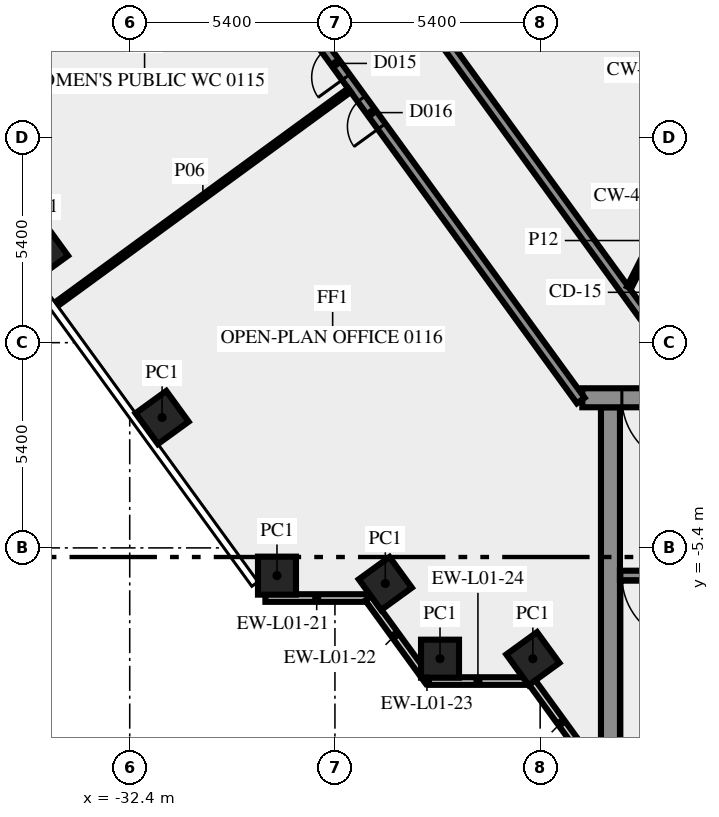
"""IFC4 building model, lengths in metres.
Left out: names, types, materials, properties, quantities, classifications, styles, units other than length and angle.
Written with IfcOpenShell. Run it as: python <this file> out.ifc"""

import sys

from ifc_helpers import new_model, si_unit, direction, frame, frame_2d, origin, origin_2d, place, context, subcontext, project, spatial, rectangle, extrude, element, fill, save


model = new_model("IFC4")
c1 = context("Model", 3, precision=1e-05, world=origin(), true_north=direction((0.0, 1.0)))
c2 = subcontext(c1, "Body", "Model", "MODEL_VIEW")
j1 = project(units=[si_unit("LENGTHUNIT", "METRE"), si_unit("PLANEANGLEUNIT", "RADIAN")], contexts=[c1])
p1 = place(None, origin())
s1 = spatial("IfcSite", under=j1, at=p1, CompositionType="ELEMENT")
p2 = place(p1, origin())
s2 = spatial("IfcBuilding", under=s1, at=p2, CompositionType="ELEMENT")
p3 = place(p2, frame((0.0, 0.0, 6.0)))
s3 = spatial("IfcBuildingStorey", under=s2, at=p3, CompositionType="ELEMENT", Elevation=6.0)
for number, where, z_axis, x_axis in (
    (1, (-34.722, 2.4, 0.0), (0.0, 0.0, 1.0), (0.588, -0.809, 0.0)),
    (2, (-31.548, -1.969, 0.0), (0.0, 0.0, 1.0), (0.588, -0.809, 0.0)),
    (3, (-28.525, -6.13, 0.0), (0.0, 0.0, 1.0), (1.0, 0.0, 0.0)),
    (4, (-25.674, -6.337, 0.0), (0.0, 0.0, 1.0), (0.588, -0.809, 0.0)),
    (5, (-24.235, -8.315, 0.0), (0.0, 0.0, 1.0), (1.0, 0.0, 0.0)),
    (6, (-21.792, -8.315, 0.0), (0.0, 0.0, 1.0), (0.588, -0.809, 0.0)),
):
    element("IfcColumn", number, at=place(p3, frame(where, z_axis=z_axis, x_axis=x_axis)), inside=s3, PredefinedType="COLUMN", context=c2, shape_type="SweptSolid", body=[
        extrude(rectangle(XDim=1.0, YDim=1.0, at=origin_2d()), origin(), (0.0, 0.0, 1.0), 5.1),
    ])
p4 = place(p3, frame((-28.83, -6.719, 0.0), z_axis=(0.0, 0.0, 1.0), x_axis=(1.0, 0.0, 0.0)))
e7 = element("IfcWall", 7, at=p4, inside=s3, PredefinedType="SOLIDWALL", context=c2, shape_type="SweptSolid", body=[
    extrude(rectangle(XDim=2.7, YDim=0.2, at=frame_2d((1.35, 0.0))), origin(), (0.0, 0.0, 1.0), 5.1),
])
p5 = place(p3, frame((-26.12, -6.724, 0.0), z_axis=(0.0, 0.0, 1.0), x_axis=(0.587706476352, -0.809074222587, 0.0)))
e8 = element("IfcWall", 8, at=p5, inside=s3, PredefinedType="SOLIDWALL", context=c2, shape_type="SweptSolid", body=[
    extrude(rectangle(XDim=2.403, YDim=0.2, at=frame_2d((1.202, 0.0))), origin(), (0.0, 0.0, 1.0), 5.1),
])
p6 = place(p3, frame((-24.624, -8.784, 0.0), z_axis=(0.0, 0.0, 1.0), x_axis=(0.586760218966, -0.809760733451, 0.0)))
e9 = element("IfcWall", 9, at=p6, inside=s3, PredefinedType="SOLIDWALL", context=c2, shape_type="SweptSolid", body=[
    extrude(rectangle(XDim=0.154, YDim=0.2, at=frame_2d((0.077, 0.0))), origin(), (0.0, 0.0, 1.0), 5.1),
])
p7 = place(p3, frame((-24.531, -8.904, 0.0), z_axis=(0.0, 0.0, 1.0), x_axis=(1.0, 0.0, 0.0)))
e10 = element("IfcWall", 10, at=p7, inside=s3, PredefinedType="SOLIDWALL", context=c2, shape_type="SweptSolid", body=[
    extrude(rectangle(XDim=2.587, YDim=0.2, at=frame_2d((1.294, 0.0))), origin(), (0.0, 0.0, 1.0), 5.1),
])
p8 = place(p3, frame((-21.833, -8.909, 0.0), z_axis=(0.0, 0.0, 1.0), x_axis=(0.587766567315, -0.809030569476, 0.0)))
e11 = element("IfcWall", 11, at=p8, inside=s3, PredefinedType="SOLIDWALL", context=c2, shape_type="SweptSolid", body=[
    extrude(rectangle(XDim=2.688, YDim=0.2, at=frame_2d((1.344, 0.0))), origin(), (0.0, 0.0, 1.0), 5.1),
])
p9 = place(p3, frame((-19.75, -10.5, 0.0), z_axis=(0.0, 0.0, 1.0), x_axis=(0.0, 1.0, 0.0)))
e12 = element("IfcWall", 12, at=p9, inside=s3, PredefinedType="SHEAR", context=c2, shape_type="SweptSolid", body=[
    extrude(rectangle(XDim=8.8, YDim=0.5, at=frame_2d((4.4, 0.0))), origin(), (0.0, 0.0, 1.0), 5.1),
])
p10 = place(p3, frame((-11.45, -6.125, 0.0), z_axis=(0.0, 0.0, 1.0), x_axis=(-1.0, 0.0, 0.0)))
e13 = element("IfcWall", 13, at=p10, inside=s3, PredefinedType="SHEAR", context=c2, shape_type="SweptSolid", body=[
    extrude(rectangle(XDim=8.05, YDim=0.25, at=frame_2d((4.025, 0.0))), origin(), (0.0, 0.0, 1.0), 5.1),
])
p11 = place(p10, frame((6.2, 0.0, 0.0)))
e14 = element("IfcOpeningElement", 14, at=p11, cuts=e13, PredefinedType="OPENING", context=c2, shape_type="SweptSolid", body=[
    extrude(rectangle(XDim=1.8, YDim=2.1, at=frame_2d((0.9, 1.05))), frame((0.0, 0.135, 0.0), z_axis=(0.0, -1.0, 0.0), x_axis=(1.0, 0.0, 0.0)), (0.0, 0.0, 1.0), 0.27),
])
p12 = place(p3, frame((20.49, -1.45, 0.0), z_axis=(0.0, 0.0, 1.0), x_axis=(-1.0, 0.0, 0.0)))
e15 = element("IfcWall", 15, at=p12, inside=s3, PredefinedType="SHEAR", context=c2, shape_type="SweptSolid", body=[
    extrude(rectangle(XDim=40.98, YDim=0.5, at=frame_2d((20.49, 0.0))), origin(), (0.0, 0.0, 1.0), 5.1),
])
p13 = place(p12, frame((38.14, 0.0, 0.0)))
e16 = element("IfcOpeningElement", 16, at=p13, cuts=e15, PredefinedType="OPENING", context=c2, shape_type="SweptSolid", body=[
    extrude(rectangle(XDim=1.8, YDim=2.1, at=frame_2d((0.9, 1.05))), frame((0.0, 0.26, 0.0), z_axis=(0.0, -1.0, 0.0), x_axis=(1.0, 0.0, 0.0)), (0.0, 0.0, 1.0), 0.52),
])
p14 = place(p12, frame((36.728, 0.0, 0.0)))
e17 = element("IfcOpeningElement", 17, at=p14, cuts=e15, PredefinedType="OPENING", context=c2, shape_type="SweptSolid", body=[
    extrude(rectangle(XDim=0.8, YDim=2.1, at=frame_2d((0.4, 1.05))), frame((0.0, 0.26, 0.0), z_axis=(0.0, -1.0, 0.0), x_axis=(1.0, 0.0, 0.0)), (0.0, 0.0, 1.0), 0.52),
])
p15 = place(p12, frame((35.153, 0.0, 0.0)))
e18 = element("IfcOpeningElement", 18, at=p15, cuts=e15, PredefinedType="OPENING", context=c2, shape_type="SweptSolid", body=[
    extrude(rectangle(XDim=0.8, YDim=2.1, at=frame_2d((0.4, 1.05))), frame((0.0, 0.26, 0.0), z_axis=(0.0, -1.0, 0.0), x_axis=(1.0, 0.0, 0.0)), (0.0, 0.0, 1.0), 0.52),
])
p16 = place(p12, frame((32.94, 0.0, 0.0)))
e19 = element("IfcOpeningElement", 19, at=p16, cuts=e15, PredefinedType="OPENING", context=c2, shape_type="SweptSolid", body=[
    extrude(rectangle(XDim=0.9, YDim=2.1, at=frame_2d((0.45, 1.05))), frame((0.0, 0.26, 0.0), z_axis=(0.0, -1.0, 0.0), x_axis=(1.0, 0.0, 0.0)), (0.0, 0.0, 1.0), 0.52),
])
p17 = place(p12, frame((19.59, 0.0, 0.0)))
e20 = element("IfcOpeningElement", 20, at=p17, cuts=e15, PredefinedType="OPENING", context=c2, shape_type="SweptSolid", body=[
    extrude(rectangle(XDim=2.0, YDim=2.1, at=frame_2d((1.0, 1.05))), frame((0.0, 0.26, 0.0), z_axis=(0.0, -1.0, 0.0), x_axis=(1.0, 0.0, 0.0)), (0.0, 0.0, 1.0), 0.52),
])
p18 = place(p12, frame((7.14, 0.0, 0.0)))
e21 = element("IfcOpeningElement", 21, at=p18, cuts=e15, PredefinedType="OPENING", context=c2, shape_type="SweptSolid", body=[
    extrude(rectangle(XDim=0.9, YDim=2.1, at=frame_2d((0.45, 1.05))), frame((0.0, 0.26, 0.0), z_axis=(0.0, -1.0, 0.0), x_axis=(1.0, 0.0, 0.0)), (0.0, 0.0, 1.0), 0.52),
])
p19 = place(p12, frame((4.19, 0.0, 0.0)))
e22 = element("IfcOpeningElement", 22, at=p19, cuts=e15, PredefinedType="OPENING", context=c2, shape_type="SweptSolid", body=[
    extrude(rectangle(XDim=0.9, YDim=2.1, at=frame_2d((0.45, 1.05))), frame((0.0, 0.26, 0.0), z_axis=(0.0, -1.0, 0.0), x_axis=(1.0, 0.0, 0.0)), (0.0, 0.0, 1.0), 0.52),
])
p20 = place(p12, frame((1.04, 0.0, 0.0)))
e23 = element("IfcOpeningElement", 23, at=p20, cuts=e15, PredefinedType="OPENING", context=c2, shape_type="SweptSolid", body=[
    extrude(rectangle(XDim=1.8, YDim=2.1, at=frame_2d((0.9, 1.05))), frame((0.0, 0.26, 0.0), z_axis=(0.0, -1.0, 0.0), x_axis=(1.0, 0.0, 0.0)), (0.0, 0.0, 1.0), 0.52),
])
p21 = place(p3, frame((-20.531, -1.523, 0.0), z_axis=(0.0, 0.0, 1.0), x_axis=(-0.587784522481, 0.809017524614, 0.0)))
e24 = element("IfcWall", 24, at=p21, inside=s3, PredefinedType="SOLIDWALL", context=c2, shape_type="SweptSolid", body=[
    extrude(rectangle(XDim=49.912, YDim=0.25, at=frame_2d((24.956, 0.0))), origin(), (0.0, 0.0, 1.0), 5.1),
])
p22 = place(p21, frame((48.57, 0.0, 0.0)))
e25 = element("IfcOpeningElement", 25, at=p22, cuts=e24, PredefinedType="OPENING", context=c2, shape_type="SweptSolid", body=[
    extrude(rectangle(XDim=0.9, YDim=2.1, at=frame_2d((0.45, 1.05))), frame((0.0, 0.135, 0.0), z_axis=(0.0, -1.0, 0.0), x_axis=(1.0, 0.0, 0.0)), (0.0, 0.0, 1.0), 0.27),
])
p23 = place(p21, frame((10.516, 0.0, 0.0)))
e26 = element("IfcOpeningElement", 26, at=p23, cuts=e24, PredefinedType="OPENING", context=c2, shape_type="SweptSolid", body=[
    extrude(rectangle(XDim=0.9, YDim=2.1, at=frame_2d((0.45, 1.05))), frame((0.0, 0.135, 0.0), z_axis=(0.0, -1.0, 0.0), x_axis=(1.0, 0.0, 0.0)), (0.0, 0.0, 1.0), 0.27),
])
p24 = place(p21, frame((23.766, 0.0, 0.0)))
e27 = element("IfcOpeningElement", 27, at=p24, cuts=e24, PredefinedType="OPENING", context=c2, shape_type="SweptSolid", body=[
    extrude(rectangle(XDim=0.9, YDim=2.1, at=frame_2d((0.45, 1.05))), frame((0.0, 0.135, 0.0), z_axis=(0.0, -1.0, 0.0), x_axis=(1.0, 0.0, 0.0)), (0.0, 0.0, 1.0), 0.27),
])
p25 = place(p21, frame((8.916, 0.0, 0.0)))
e28 = element("IfcOpeningElement", 28, at=p25, cuts=e24, PredefinedType="OPENING", context=c2, shape_type="SweptSolid", body=[
    extrude(rectangle(XDim=0.9, YDim=2.1, at=frame_2d((0.45, 1.05))), frame((0.0, 0.135, 0.0), z_axis=(0.0, -1.0, 0.0), x_axis=(1.0, 0.0, 0.0)), (0.0, 0.0, 1.0), 0.27),
])
p26 = place(p3, frame((-37.232, 25.972, 0.0), z_axis=(0.0, 0.0, 1.0), x_axis=(0.587786323093, -0.809016216391, 0.0)))
e29 = element("IfcWall", 29, at=p26, inside=s3, PredefinedType="SOLIDWALL", context=c2, shape_type="SweptSolid", body=[
    extrude(rectangle(XDim=33.493, YDim=0.25, at=frame_2d((16.747, 0.0))), origin(), (0.0, 0.0, 1.0), 5.1),
])
p27 = place(p26, frame((13.485, 0.0, 0.0)))
e30 = element("IfcOpeningElement", 30, at=p27, cuts=e29, PredefinedType="OPENING", context=c2, shape_type="SweptSolid", body=[
    extrude(rectangle(XDim=0.9, YDim=2.1, at=frame_2d((0.45, 1.05))), frame((0.0, 0.135, 0.0), z_axis=(0.0, -1.0, 0.0), x_axis=(1.0, 0.0, 0.0)), (0.0, 0.0, 1.0), 0.27),
])
p28 = place(p26, frame((15.085, 0.0, 0.0)))
e31 = element("IfcOpeningElement", 31, at=p28, cuts=e29, PredefinedType="OPENING", context=c2, shape_type="SweptSolid", body=[
    extrude(rectangle(XDim=0.9, YDim=2.1, at=frame_2d((0.45, 1.05))), frame((0.0, 0.135, 0.0), z_axis=(0.0, -1.0, 0.0), x_axis=(1.0, 0.0, 0.0)), (0.0, 0.0, 1.0), 0.27),
])
p29 = place(p3, frame((-30.563, 12.072, 0.0), z_axis=(0.0, 0.0, 1.0), x_axis=(-0.808992136407, -0.587819464829, 0.0)))
e32 = element("IfcWall", 32, at=p29, inside=s3, PredefinedType="PARTITIONING", context=c2, shape_type="SweptSolid", body=[
    extrude(rectangle(XDim=8.45, YDim=0.12, at=frame_2d((4.225, 0.0))), origin(), (0.0, 0.0, 1.0), 5.1),
])
p30 = place(p3, frame((-34.332, 1.011, 0.0), z_axis=(0.0, 0.0, 1.0), x_axis=(0.807594822539, 0.589737740532, 0.0)))
e33 = element("IfcWall", 33, at=p30, inside=s3, PredefinedType="PARTITIONING", context=c2, shape_type="SweptSolid", body=[
    extrude(rectangle(XDim=9.55, YDim=0.12, at=frame_2d((4.775, 0.0))), origin(), (0.0, 0.0, 1.0), 4.1),
])
p31 = place(p3, frame((-19.261, 1.45, 0.0), z_axis=(0.0, 0.0, 1.0), x_axis=(0.453950796792, 0.891026752736, 0.0)))
e34 = element("IfcWall", 34, at=p31, inside=s3, PredefinedType="PARTITIONING", context=c2, shape_type="SweptSolid", body=[
    extrude(rectangle(XDim=2.778, YDim=0.12, at=frame_2d((1.389, 0.0))), origin(), (0.0, 0.0, 1.0), 5.1),
])
p32 = place(p11, origin())
e35 = element("IfcDoor", 35, at=p32, inside=s3, OperationType="DOUBLE_DOOR_SINGLE_SWING", PredefinedType="DOOR", context=c2, shape_type="SweptSolid", body=[
    extrude(rectangle(XDim=1.8, YDim=2.1, at=frame_2d((0.9, 1.05))), frame((0.0, 0.025, 0.0), z_axis=(0.0, -1.0, 0.0), x_axis=(1.0, 0.0, 0.0)), (0.0, 0.0, 1.0), 0.05),
])
fill(e14, e35)
p33 = place(p13, origin())
e36 = element("IfcDoor", 36, at=p33, inside=s3, OperationType="DOUBLE_DOOR_SINGLE_SWING", PredefinedType="DOOR", context=c2, shape_type="SweptSolid", body=[
    extrude(rectangle(XDim=1.8, YDim=2.1, at=frame_2d((0.9, 1.05))), frame((0.0, 0.025, 0.0), z_axis=(0.0, -1.0, 0.0), x_axis=(1.0, 0.0, 0.0)), (0.0, 0.0, 1.0), 0.05),
])
fill(e16, e36)
p34 = place(p23, origin())
e37 = element("IfcDoor", 37, at=p34, inside=s3, OperationType="SINGLE_SWING_LEFT", PredefinedType="DOOR", context=c2, shape_type="SweptSolid", body=[
    extrude(rectangle(XDim=0.9, YDim=2.1, at=frame_2d((0.45, 1.05))), frame((0.0, 0.025, 0.0), z_axis=(0.0, -1.0, 0.0), x_axis=(1.0, 0.0, 0.0)), (0.0, 0.0, 1.0), 0.05),
])
fill(e26, e37)
p35 = place(p25, origin())
e38 = element("IfcDoor", 38, at=p35, inside=s3, OperationType="SINGLE_SWING_RIGHT", PredefinedType="DOOR", context=c2, shape_type="SweptSolid", body=[
    extrude(rectangle(XDim=0.9, YDim=2.1, at=frame_2d((0.45, 1.05))), frame((0.0, 0.025, 0.0), z_axis=(0.0, -1.0, 0.0), x_axis=(1.0, 0.0, 0.0)), (0.0, 0.0, 1.0), 0.05),
])
fill(e28, e38)
save(model, sys.argv[1])
